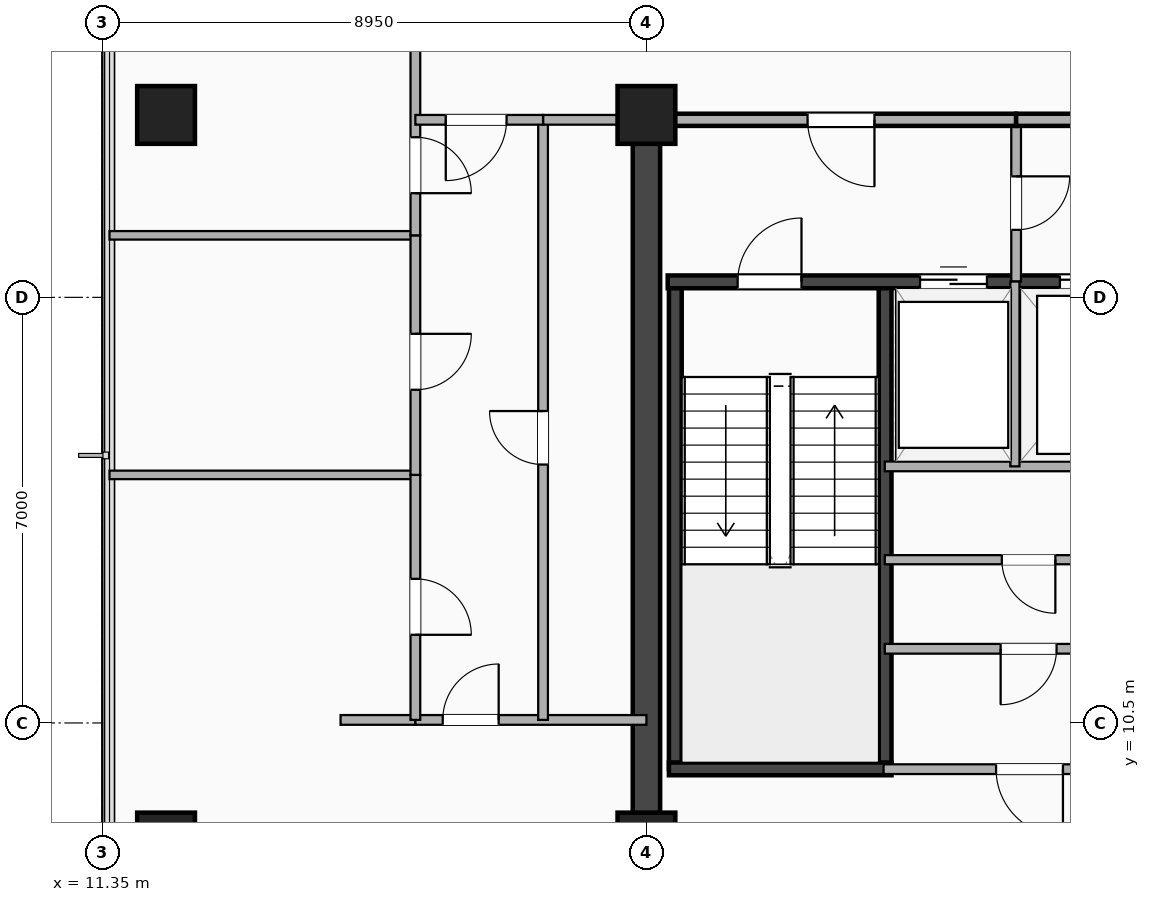
"""IFC4 building model, lengths in metres.
Left out: names, types, materials, properties, quantities, classifications, styles, units other than length and angle.
Written with IfcOpenShell. Run it as: python <this file> out.ifc"""

import sys

from ifc_helpers import new_model, si_unit, direction, frame, frame_2d, origin, origin_2d, place, context, subcontext, project, spatial, rectangle, extrude, element, fill, save


model = new_model("IFC4")
c1 = context("Model", 3, precision=1e-05, world=origin(), true_north=direction((0.0, 1.0)))
c2 = subcontext(c1, "Body", "Model", "MODEL_VIEW")
j1 = project(units=[si_unit("LENGTHUNIT", "METRE"), si_unit("PLANEANGLEUNIT", "RADIAN")], contexts=[c1])
p1 = place(None, origin())
s1 = spatial("IfcSite", under=j1, at=p1, CompositionType="ELEMENT")
p2 = place(p1, origin())
s2 = spatial("IfcBuilding", under=s1, at=p2, CompositionType="ELEMENT")
p3 = place(p2, frame((0.0, 0.0, 192.5)))
s3 = spatial("IfcBuildingStorey", under=s2, at=p3, CompositionType="ELEMENT", Elevation=192.5)
p4 = place(p3, frame((20.3, 3.5, 0.0), z_axis=(0.0, 0.0, 1.0), x_axis=(0.0, 1.0, 0.0)))
e1 = element("IfcWall", 1, at=p4, inside=s3, PredefinedType="SHEAR", context=c2, shape_type="SweptSolid", body=[
    extrude(rectangle(XDim=16.9, YDim=0.45, at=frame_2d((8.45, 0.0))), origin(), (0.0, 0.0, 1.0), 4.16),
])
for number, where, z_axis, x_axis in (
    (2, (20.775, 9.745, 0.0), (0.0, 0.0, 1.0), (0.0, 1.0, 0.0)),
    (3, (24.225, 9.745, 0.0), (0.0, 0.0, 1.0), (0.0, 1.0, 0.0)),
):
    element("IfcWall", number, at=place(p3, frame(where, z_axis=z_axis, x_axis=x_axis)), inside=s3, PredefinedType="SHEAR", context=c2, shape_type="SweptSolid", body=[
        extrude(rectangle(XDim=8.01, YDim=0.21, at=frame_2d((4.005, 0.0))), origin(), (0.0, 0.0, 1.0), 4.16),
    ])
p5 = place(p3, frame((20.67, 9.745, 0.0), z_axis=(0.0, 0.0, 1.0), x_axis=(1.0, 0.0, 0.0)))
e4 = element("IfcWall", 4, at=p5, inside=s3, PredefinedType="SHEAR", context=c2, shape_type="SweptSolid", body=[
    extrude(rectangle(XDim=3.66, YDim=0.21, at=frame_2d((1.83, 0.0))), origin(), (0.0, 0.0, 1.0), 4.16),
])
p6 = place(p3, frame((20.65, 17.755, 0.0), z_axis=(0.0, 0.0, 1.0), x_axis=(1.0, 0.0, 0.0)))
e5 = element("IfcWall", 5, at=p6, inside=s3, PredefinedType="SHEAR", context=c2, shape_type="SweptSolid", body=[
    extrude(rectangle(XDim=8.3, YDim=0.21, at=frame_2d((4.15, 0.0))), origin(), (0.0, 0.0, 1.0), 4.16),
])
p7 = place(p6, frame((2.2, 0.0, 0.0), z_axis=(0.0, 0.0, 1.0), x_axis=(-1.0, 0.0, 0.0)))
e6 = element("IfcOpeningElement", 6, at=p7, cuts=e5, PredefinedType="OPENING", context=c2, shape_type="SweptSolid", body=[
    extrude(rectangle(XDim=1.05, YDim=2.15, at=frame_2d((0.525, 1.075))), frame((0.0, 0.115, 0.0), z_axis=(0.0, -1.0, 0.0), x_axis=(1.0, 0.0, 0.0)), (0.0, 0.0, 1.0), 0.23),
])
p8 = place(p6, frame((4.15, 0.0, 0.0)))
e7 = element("IfcOpeningElement", 7, at=p8, cuts=e5, PredefinedType="OPENING", context=c2, shape_type="SweptSolid", body=[
    extrude(rectangle(XDim=1.1, YDim=2.18, at=frame_2d((0.55, 1.09))), frame((0.0, 0.115, 0.0), z_axis=(0.0, -1.0, 0.0), x_axis=(1.0, 0.0, 0.0)), (0.0, 0.0, 1.0), 0.23),
])
p9 = place(p6, frame((6.45, 0.0, 0.0)))
e8 = element("IfcOpeningElement", 8, at=p9, cuts=e5, PredefinedType="OPENING", context=c2, shape_type="SweptSolid", body=[
    extrude(rectangle(XDim=1.12, YDim=2.2, at=frame_2d((0.56, 1.1))), frame((0.0, 0.115, 0.0), z_axis=(0.0, -1.0, 0.0), x_axis=(1.0, 0.0, 0.0)), (0.0, 0.0, 1.0), 0.23),
])
for number, where, z_axis, x_axis in (
    (9, (20.3, 8.55, -0.24), (0.0, 0.0, 1.0), (1.0, 0.0, 0.0)),
    (10, (20.3, 20.5, -0.24), (0.0, 0.0, 1.0), (1.0, 0.0, 0.0)),
    (11, (12.4, 8.55, -0.24), (0.0, 0.0, 1.0), (1.0, 0.0, 0.0)),
    (12, (12.4, 20.5, -0.24), (0.0, 0.0, 1.0), (1.0, 0.0, 0.0)),
):
    element("IfcColumn", number, at=place(p3, frame(where, z_axis=z_axis, x_axis=x_axis)), inside=s3, PredefinedType="COLUMN", context=c2, shape_type="SweptSolid", body=[
        extrude(rectangle(XDim=0.95, YDim=0.95, at=origin_2d()), origin(), (0.0, 0.0, 1.0), 4.4),
    ])
p10 = place(p3, frame((26.38, 17.76, 0.0), z_axis=(0.0, 0.0, 1.0), x_axis=(0.0, 1.0, 0.0)))
e13 = element("IfcWall", 13, at=p10, inside=s3, PredefinedType="PARTITIONING", context=c2, shape_type="SweptSolid", body=[
    extrude(rectangle(XDim=2.66, YDim=0.16, at=frame_2d((1.33, 0.0))), origin(), (0.0, 0.0, 1.0), 3.606),
])
p11 = place(p10, frame((0.85, 0.0, 0.0)))
e14 = element("IfcOpeningElement", 14, at=p11, cuts=e13, PredefinedType="OPENING", context=c2, shape_type="SweptSolid", body=[
    extrude(rectangle(XDim=0.88, YDim=2.08, at=frame_2d((0.44, 1.04))), frame((0.0, 0.09, 0.0), z_axis=(0.0, -1.0, 0.0), x_axis=(1.0, 0.0, 0.0)), (0.0, 0.0, 1.0), 0.18),
])
p12 = place(p3, frame((24.22, 14.72, 0.0), z_axis=(0.0, 0.0, 1.0), x_axis=(1.0, 0.0, 0.0)))
e15 = element("IfcWall", 15, at=p12, inside=s3, PredefinedType="PARTITIONING", context=c2, shape_type="SweptSolid", body=[
    extrude(rectangle(XDim=4.73, YDim=0.16, at=frame_2d((2.365, 0.0))), origin(), (0.0, 0.0, 1.0), 4.16),
])
p13 = place(p3, frame((26.36, 14.72, 0.0), z_axis=(0.0, 0.0, 1.0), x_axis=(0.0, 1.0, 0.0)))
e16 = element("IfcWall", 16, at=p13, inside=s3, PredefinedType="PARTITIONING", context=c2, shape_type="SweptSolid", body=[
    extrude(rectangle(XDim=3.04, YDim=0.15, at=frame_2d((1.52, 0.0))), origin(), (0.0, 0.0, 1.0), 4.16),
])
p14 = place(p3, frame((20.65, 20.42, 0.0), z_axis=(0.0, 0.0, 1.0), x_axis=(1.0, 0.0, 0.0)))
e17 = element("IfcWall", 17, at=p14, inside=s3, PredefinedType="PARTITIONING", context=c2, shape_type="SweptSolid", body=[
    extrude(rectangle(XDim=5.73, YDim=0.2, at=frame_2d((2.865, 0.0))), origin(), (0.0, 0.0, 1.0), 3.372),
])
p15 = place(p14, frame((2.3, 0.0, 0.0)))
e18 = element("IfcOpeningElement", 18, at=p15, cuts=e17, PredefinedType="OPENING", context=c2, shape_type="SweptSolid", body=[
    extrude(rectangle(XDim=1.1, YDim=2.15, at=frame_2d((0.55, 1.075))), frame((0.0, 0.11, 0.0), z_axis=(0.0, -1.0, 0.0), x_axis=(1.0, 0.0, 0.0)), (0.0, 0.0, 1.0), 0.22),
])
p16 = place(p3, frame((26.38, 20.42, 0.0), z_axis=(0.0, 0.0, 1.0), x_axis=(1.0, 0.0, 0.0)))
e19 = element("IfcWall", 19, at=p16, inside=s3, PredefinedType="PARTITIONING", context=c2, shape_type="SweptSolid", body=[
    extrude(rectangle(XDim=2.82, YDim=0.2, at=frame_2d((1.41, 0.0))), origin(), (0.0, 0.0, 1.0), 3.372),
])
p17 = place(p3, frame((24.22, 11.72, 0.0), z_axis=(0.0, 0.0, 1.0), x_axis=(1.0, 0.0, 0.0)))
e20 = element("IfcWall", 20, at=p17, inside=s3, PredefinedType="PARTITIONING", context=c2, shape_type="SweptSolid", body=[
    extrude(rectangle(XDim=4.73, YDim=0.16, at=frame_2d((2.365, 0.0))), origin(), (0.0, 0.0, 1.0), 4.16),
])
p18 = place(p17, frame((1.905, 0.0, 0.0)))
e21 = element("IfcOpeningElement", 21, at=p18, cuts=e20, PredefinedType="OPENING", context=c2, shape_type="SweptSolid", body=[
    extrude(rectangle(XDim=0.92, YDim=2.08, at=frame_2d((0.46, 1.04))), frame((0.0, 0.09, 0.0), z_axis=(0.0, -1.0, 0.0), x_axis=(1.0, 0.0, 0.0)), (0.0, 0.0, 1.0), 0.18),
])
p19 = place(p3, frame((24.22, 13.185, 0.0), z_axis=(0.0, 0.0, 1.0), x_axis=(1.0, 0.0, 0.0)))
e22 = element("IfcWall", 22, at=p19, inside=s3, PredefinedType="PARTITIONING", context=c2, shape_type="SweptSolid", body=[
    extrude(rectangle(XDim=4.73, YDim=0.15, at=frame_2d((2.365, 0.0))), origin(), (0.0, 0.0, 1.0), 4.16),
])
p20 = place(p19, frame((1.925, 0.0, 0.0)))
e23 = element("IfcOpeningElement", 23, at=p20, cuts=e22, PredefinedType="OPENING", context=c2, shape_type="SweptSolid", body=[
    extrude(rectangle(XDim=0.88, YDim=2.08, at=frame_2d((0.44, 1.04))), frame((0.0, 0.085, 0.0), z_axis=(0.0, -1.0, 0.0), x_axis=(1.0, 0.0, 0.0)), (0.0, 0.0, 1.0), 0.17),
])
p21 = place(p3, frame((24.2, 9.74, 0.0), z_axis=(0.0, 0.0, 1.0), x_axis=(1.0, 0.0, 0.0)))
e24 = element("IfcWall", 24, at=p21, inside=s3, PredefinedType="PARTITIONING", context=c2, shape_type="SweptSolid", body=[
    extrude(rectangle(XDim=4.8, YDim=0.16, at=frame_2d((2.4, 0.0))), origin(), (0.0, 0.0, 1.0), 4.16),
])
p22 = place(p21, frame((1.85, 0.0, 0.0)))
e25 = element("IfcOpeningElement", 25, at=p22, cuts=e24, PredefinedType="OPENING", context=c2, shape_type="SweptSolid", body=[
    extrude(rectangle(XDim=1.1, YDim=2.15, at=frame_2d((0.55, 1.075))), frame((0.0, 0.09, 0.0), z_axis=(0.0, -1.0, 0.0), x_axis=(1.0, 0.0, 0.0)), (0.0, 0.0, 1.0), 0.18),
])
p23 = place(p3, frame((15.27, 10.55, 0.0), z_axis=(0.0, 0.0, 1.0), x_axis=(1.0, 0.0, 0.0)))
e26 = element("IfcWall", 26, at=p23, inside=s3, PredefinedType="PARTITIONING", context=c2, shape_type="SweptSolid", body=[
    extrude(rectangle(XDim=1.23, YDim=0.16, at=frame_2d((0.615, 0.0))), origin(), (0.0, 0.0, 1.0), 4.16),
])
p24 = place(p3, frame((16.5, 10.55, 0.0), z_axis=(0.0, 0.0, 1.0), x_axis=(1.0, 0.0, 0.0)))
e27 = element("IfcWall", 27, at=p24, inside=s3, PredefinedType="PARTITIONING", context=c2, shape_type="SweptSolid", body=[
    extrude(rectangle(XDim=3.8, YDim=0.16, at=frame_2d((1.9, 0.0))), origin(), (0.0, 0.0, 1.0), 3.372),
])
p25 = place(p24, frame((1.37, 0.0, 0.0), z_axis=(0.0, 0.0, 1.0), x_axis=(-1.0, 0.0, 0.0)))
e28 = element("IfcOpeningElement", 28, at=p25, cuts=e27, PredefinedType="OPENING", context=c2, shape_type="SweptSolid", body=[
    extrude(rectangle(XDim=0.92, YDim=2.08, at=frame_2d((0.46, 1.04))), frame((0.0, 0.09, 0.0), z_axis=(0.0, -1.0, 0.0), x_axis=(1.0, 0.0, 0.0)), (0.0, 0.0, 1.0), 0.18),
])
for number, where, z_axis, x_axis in (
    (29, (11.47, 14.58, 0.0), (0.0, 0.0, 1.0), (1.0, 0.0, 0.0)),
    (30, (11.47, 18.52, 0.0), (0.0, 0.0, 1.0), (1.0, 0.0, 0.0)),
):
    element("IfcWall", number, at=place(p3, frame(where, z_axis=z_axis, x_axis=x_axis)), inside=s3, PredefinedType="PARTITIONING", context=c2, shape_type="SweptSolid", body=[
        extrude(rectangle(XDim=5.03, YDim=0.14, at=frame_2d((2.515, 0.0))), origin(), (0.0, 0.0, 1.0), 3.682),
    ])
p26 = place(p3, frame((16.5, 10.55, 0.0), z_axis=(0.0, 0.0, 1.0), x_axis=(0.0, 1.0, 0.0)))
e31 = element("IfcWall", 31, at=p26, inside=s3, PredefinedType="PARTITIONING", context=c2, shape_type="SweptSolid", body=[
    extrude(rectangle(XDim=4.03, YDim=0.16, at=frame_2d((2.015, 0.0))), origin(), (0.0, 0.0, 1.0), 3.898),
])
p27 = place(p26, frame((1.4, 0.0, 0.0)))
e32 = element("IfcOpeningElement", 32, at=p27, cuts=e31, PredefinedType="OPENING", context=c2, shape_type="SweptSolid", body=[
    extrude(rectangle(XDim=0.92, YDim=2.08, at=frame_2d((0.46, 1.04))), frame((0.0, 0.09, 0.0), z_axis=(0.0, -1.0, 0.0), x_axis=(1.0, 0.0, 0.0)), (0.0, 0.0, 1.0), 0.18),
])
p28 = place(p3, frame((16.5, 14.58, 0.0), z_axis=(0.0, 0.0, 1.0), x_axis=(0.0, 1.0, 0.0)))
e33 = element("IfcWall", 33, at=p28, inside=s3, PredefinedType="PARTITIONING", context=c2, shape_type="SweptSolid", body=[
    extrude(rectangle(XDim=3.94, YDim=0.16, at=frame_2d((1.97, 0.0))), origin(), (0.0, 0.0, 1.0), 3.898),
])
p29 = place(p28, frame((1.4, 0.0, 0.0)))
e34 = element("IfcOpeningElement", 34, at=p29, cuts=e33, PredefinedType="OPENING", context=c2, shape_type="SweptSolid", body=[
    extrude(rectangle(XDim=0.92, YDim=2.08, at=frame_2d((0.46, 1.04))), frame((0.0, 0.09, 0.0), z_axis=(0.0, -1.0, 0.0), x_axis=(1.0, 0.0, 0.0)), (0.0, 0.0, 1.0), 0.18),
])
p30 = place(p3, frame((16.5, 18.52, 0.0), z_axis=(0.0, 0.0, 1.0), x_axis=(0.0, 1.0, 0.0)))
e35 = element("IfcWall", 35, at=p30, inside=s3, PredefinedType="PARTITIONING", context=c2, shape_type="SweptSolid", body=[
    extrude(rectangle(XDim=4.2, YDim=0.16, at=frame_2d((2.1, 0.0))), origin(), (0.0, 0.0, 1.0), 3.372),
])
p31 = place(p30, frame((0.693, 0.0, 0.0)))
e36 = element("IfcOpeningElement", 36, at=p31, cuts=e35, PredefinedType="OPENING", context=c2, shape_type="SweptSolid", body=[
    extrude(rectangle(XDim=0.92, YDim=2.08, at=frame_2d((0.46, 1.04))), frame((0.0, 0.09, 0.0), z_axis=(0.0, -1.0, 0.0), x_axis=(1.0, 0.0, 0.0)), (0.0, 0.0, 1.0), 0.18),
])
p32 = place(p3, frame((18.6, 10.55, 0.0), z_axis=(0.0, 0.0, 1.0), x_axis=(0.0, 1.0, 0.0)))
e37 = element("IfcWall", 37, at=p32, inside=s3, PredefinedType="PARTITIONING", context=c2, shape_type="SweptSolid", body=[
    extrude(rectangle(XDim=9.87, YDim=0.16, at=frame_2d((4.935, 0.0))), origin(), (0.0, 0.0, 1.0), 3.372),
])
p33 = place(p32, frame((5.08, 0.0, 0.0), z_axis=(0.0, 0.0, 1.0), x_axis=(-1.0, 0.0, 0.0)))
e38 = element("IfcOpeningElement", 38, at=p33, cuts=e37, PredefinedType="OPENING", context=c2, shape_type="SweptSolid", body=[
    extrude(rectangle(XDim=0.88, YDim=2.08, at=frame_2d((0.44, 1.04))), frame((0.0, 0.09, 0.0), z_axis=(0.0, -1.0, 0.0), x_axis=(1.0, 0.0, 0.0)), (0.0, 0.0, 1.0), 0.18),
])
p34 = place(p3, frame((18.6, 20.42, 0.0), z_axis=(0.0, 0.0, 1.0), x_axis=(1.0, 0.0, 0.0)))
e39 = element("IfcWall", 39, at=p34, inside=s3, PredefinedType="PARTITIONING", context=c2, shape_type="SweptSolid", body=[
    extrude(rectangle(XDim=1.7, YDim=0.16, at=frame_2d((0.85, 0.0))), origin(), (0.0, 0.0, 1.0), 3.372),
])
p35 = place(p3, frame((16.5, 20.42, 0.0), z_axis=(0.0, 0.0, 1.0), x_axis=(1.0, 0.0, 0.0)))
e40 = element("IfcWall", 40, at=p35, inside=s3, PredefinedType="PARTITIONING", context=c2, shape_type="SweptSolid", body=[
    extrude(rectangle(XDim=2.1, YDim=0.16, at=frame_2d((1.05, 0.0))), origin(), (0.0, 0.0, 1.0), 3.372),
])
p36 = place(p35, frame((0.5, 0.0, 0.0)))
e41 = element("IfcOpeningElement", 41, at=p36, cuts=e40, PredefinedType="OPENING", context=c2, shape_type="SweptSolid", body=[
    extrude(rectangle(XDim=1.0, YDim=2.15, at=frame_2d((0.5, 1.075))), frame((0.0, 0.09, 0.0), z_axis=(0.0, -1.0, 0.0), x_axis=(1.0, 0.0, 0.0)), (0.0, 0.0, 1.0), 0.18),
])
p37 = place(p7, origin())
e42 = element("IfcDoor", 42, at=p37, inside=s3, OperationType="SINGLE_SWING_RIGHT", PredefinedType="DOOR", context=c2, shape_type="SweptSolid", body=[
    extrude(rectangle(XDim=1.05, YDim=2.15, at=frame_2d((0.525, 1.075))), frame((0.0, 0.025, 0.0), z_axis=(0.0, -1.0, 0.0), x_axis=(1.0, 0.0, 0.0)), (0.0, 0.0, 1.0), 0.05),
])
fill(e6, e42)
p38 = place(p8, origin())
e43 = element("IfcDoor", 43, at=p38, inside=s3, OperationType="DOUBLE_DOOR_SLIDING", PredefinedType="DOOR", context=c2, shape_type="SweptSolid", body=[
    extrude(rectangle(XDim=1.1, YDim=2.18, at=frame_2d((0.55, 1.09))), frame((0.0, 0.025, 0.0), z_axis=(0.0, -1.0, 0.0), x_axis=(1.0, 0.0, 0.0)), (0.0, 0.0, 1.0), 0.05),
])
fill(e7, e43)
p39 = place(p9, origin())
e44 = element("IfcDoor", 44, at=p39, inside=s3, OperationType="DOUBLE_DOOR_SLIDING", PredefinedType="DOOR", context=c2, shape_type="SweptSolid", body=[
    extrude(rectangle(XDim=1.12, YDim=2.2, at=frame_2d((0.56, 1.1))), frame((0.0, 0.025, 0.0), z_axis=(0.0, -1.0, 0.0), x_axis=(1.0, 0.0, 0.0)), (0.0, 0.0, 1.0), 0.05),
])
fill(e8, e44)
p40 = place(p11, origin())
e45 = element("IfcDoor", 45, at=p40, inside=s3, OperationType="SINGLE_SWING_RIGHT", PredefinedType="DOOR", context=c2, shape_type="SweptSolid", body=[
    extrude(rectangle(XDim=0.88, YDim=2.08, at=frame_2d((0.44, 1.04))), frame((0.0, 0.025, 0.0), z_axis=(0.0, -1.0, 0.0), x_axis=(1.0, 0.0, 0.0)), (0.0, 0.0, 1.0), 0.05),
])
fill(e14, e45)
p41 = place(p15, origin())
e46 = element("IfcDoor", 46, at=p41, inside=s3, OperationType="SINGLE_SWING_RIGHT", PredefinedType="DOOR", context=c2, shape_type="SweptSolid", body=[
    extrude(rectangle(XDim=1.1, YDim=2.15, at=frame_2d((0.55, 1.075))), frame((0.0, 0.025, 0.0), z_axis=(0.0, -1.0, 0.0), x_axis=(1.0, 0.0, 0.0)), (0.0, 0.0, 1.0), 0.05),
])
fill(e18, e46)
p42 = place(p18, origin())
e47 = element("IfcDoor", 47, at=p42, inside=s3, OperationType="SINGLE_SWING_LEFT", PredefinedType="DOOR", context=c2, shape_type="SweptSolid", body=[
    extrude(rectangle(XDim=0.92, YDim=2.08, at=frame_2d((0.46, 1.04))), frame((0.0, 0.025, 0.0), z_axis=(0.0, -1.0, 0.0), x_axis=(1.0, 0.0, 0.0)), (0.0, 0.0, 1.0), 0.05),
])
fill(e21, e47)
p43 = place(p20, origin())
e48 = element("IfcDoor", 48, at=p43, inside=s3, OperationType="SINGLE_SWING_RIGHT", PredefinedType="DOOR", context=c2, shape_type="SweptSolid", body=[
    extrude(rectangle(XDim=0.88, YDim=2.08, at=frame_2d((0.44, 1.04))), frame((0.0, 0.025, 0.0), z_axis=(0.0, -1.0, 0.0), x_axis=(1.0, 0.0, 0.0)), (0.0, 0.0, 1.0), 0.05),
])
fill(e23, e48)
p44 = place(p22, origin())
e49 = element("IfcDoor", 49, at=p44, inside=s3, OperationType="SINGLE_SWING_RIGHT", PredefinedType="DOOR", context=c2, shape_type="SweptSolid", body=[
    extrude(rectangle(XDim=1.1, YDim=2.15, at=frame_2d((0.55, 1.075))), frame((0.0, 0.025, 0.0), z_axis=(0.0, -1.0, 0.0), x_axis=(1.0, 0.0, 0.0)), (0.0, 0.0, 1.0), 0.05),
])
fill(e25, e49)
p45 = place(p25, origin())
e50 = element("IfcDoor", 50, at=p45, inside=s3, OperationType="SINGLE_SWING_RIGHT", PredefinedType="DOOR", context=c2, shape_type="SweptSolid", body=[
    extrude(rectangle(XDim=0.92, YDim=2.08, at=frame_2d((0.46, 1.04))), frame((0.0, 0.025, 0.0), z_axis=(0.0, -1.0, 0.0), x_axis=(1.0, 0.0, 0.0)), (0.0, 0.0, 1.0), 0.05),
])
fill(e28, e50)
p46 = place(p27, origin())
e51 = element("IfcDoor", 51, at=p46, inside=s3, OperationType="SINGLE_SWING_LEFT", PredefinedType="DOOR", context=c2, shape_type="SweptSolid", body=[
    extrude(rectangle(XDim=0.92, YDim=2.08, at=frame_2d((0.46, 1.04))), frame((0.0, 0.025, 0.0), z_axis=(0.0, -1.0, 0.0), x_axis=(1.0, 0.0, 0.0)), (0.0, 0.0, 1.0), 0.05),
])
fill(e32, e51)
p47 = place(p29, origin())
e52 = element("IfcDoor", 52, at=p47, inside=s3, OperationType="SINGLE_SWING_RIGHT", PredefinedType="DOOR", context=c2, shape_type="SweptSolid", body=[
    extrude(rectangle(XDim=0.92, YDim=2.08, at=frame_2d((0.46, 1.04))), frame((0.0, 0.025, 0.0), z_axis=(0.0, -1.0, 0.0), x_axis=(1.0, 0.0, 0.0)), (0.0, 0.0, 1.0), 0.05),
])
fill(e34, e52)
p48 = place(p31, origin())
e53 = element("IfcDoor", 53, at=p48, inside=s3, OperationType="SINGLE_SWING_LEFT", PredefinedType="DOOR", context=c2, shape_type="SweptSolid", body=[
    extrude(rectangle(XDim=0.92, YDim=2.08, at=frame_2d((0.46, 1.04))), frame((0.0, 0.025, 0.0), z_axis=(0.0, -1.0, 0.0), x_axis=(1.0, 0.0, 0.0)), (0.0, 0.0, 1.0), 0.05),
])
fill(e36, e53)
p49 = place(p33, origin())
e54 = element("IfcDoor", 54, at=p49, inside=s3, OperationType="SINGLE_SWING_RIGHT", PredefinedType="DOOR", context=c2, shape_type="SweptSolid", body=[
    extrude(rectangle(XDim=0.88, YDim=2.08, at=frame_2d((0.44, 1.04))), frame((0.0, 0.025, 0.0), z_axis=(0.0, -1.0, 0.0), x_axis=(1.0, 0.0, 0.0)), (0.0, 0.0, 1.0), 0.05),
])
fill(e38, e54)
p50 = place(p36, origin())
e55 = element("IfcDoor", 55, at=p50, inside=s3, OperationType="SINGLE_SWING_LEFT", PredefinedType="DOOR", context=c2, shape_type="SweptSolid", body=[
    extrude(rectangle(XDim=1.0, YDim=2.15, at=frame_2d((0.5, 1.075))), frame((0.0, 0.025, 0.0), z_axis=(0.0, -1.0, 0.0), x_axis=(1.0, 0.0, 0.0)), (0.0, 0.0, 1.0), 0.05),
])
fill(e41, e55)
save(model, sys.argv[1])
